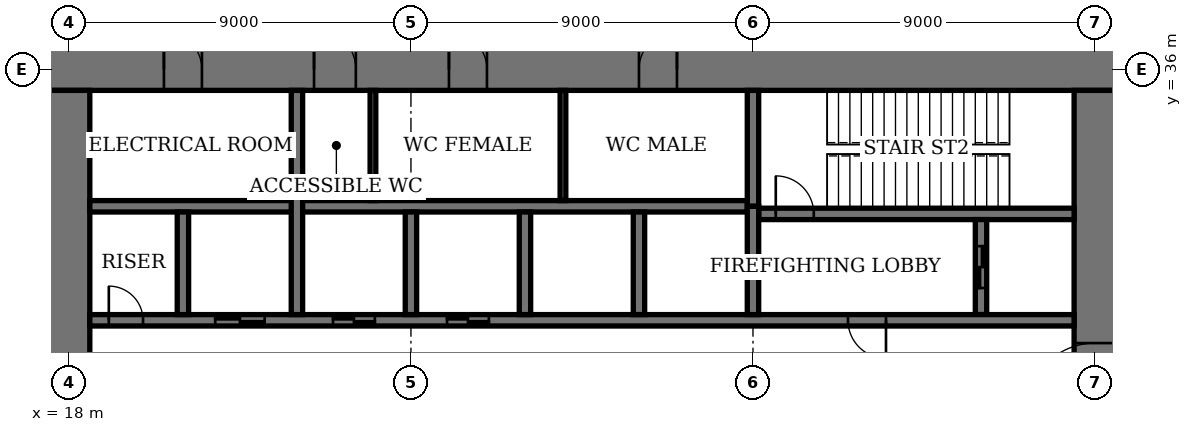
"""IFC4 building model, lengths in metres.
Left out: names, types, materials, properties, quantities, classifications, styles, units other than length and angle.
Written with IfcOpenShell. Run it as: python <this file> out.ifc"""

import sys

from ifc_helpers import new_model, si_unit, direction, frame, frame_2d, origin, place, context, subcontext, project, spatial, rectangle, extrude, element, fill, save


model = new_model("IFC4")
c1 = context("Model", 3, precision=1e-05, world=origin(), true_north=direction((0.0, 1.0)))
c2 = subcontext(c1, "Body", "Model", "MODEL_VIEW")
j1 = project(units=[si_unit("LENGTHUNIT", "METRE"), si_unit("PLANEANGLEUNIT", "RADIAN")], contexts=[c1])
p1 = place(None, origin())
s1 = spatial("IfcSite", under=j1, at=p1, CompositionType="ELEMENT")
p2 = place(p1, origin())
s2 = spatial("IfcBuilding", under=s1, at=p2, CompositionType="ELEMENT")
p3 = place(p2, frame((0.0, 0.0, 157.2)))
s3 = spatial("IfcBuildingStorey", under=s2, at=p3, CompositionType="ELEMENT", Elevation=157.2)
p4 = place(p3, frame((45.55, 36.0, 0.0), z_axis=(0.0, 0.0, 1.0), x_axis=(-1.0, 0.0, 0.0)))
e1 = element("IfcWall", 1, at=p4, inside=s3, PredefinedType="SHEAR", context=c2, shape_type="SweptSolid", body=[
    extrude(rectangle(XDim=28.1, YDim=1.1, at=frame_2d((14.05, 0.0))), origin(), (0.0, 0.0, 1.0), 5.0),
])
p5 = place(p4, frame((11.55, 0.0, 0.0)))
e2 = element("IfcOpeningElement", 2, at=p5, cuts=e1, PredefinedType="OPENING", context=c2, shape_type="SweptSolid", body=[
    extrude(rectangle(XDim=1.0, YDim=2.4, at=frame_2d((0.5, 1.2))), frame((0.0, 0.56, 0.0), z_axis=(0.0, -1.0, 0.0), x_axis=(1.0, 0.0, 0.0)), (0.0, 0.0, 1.0), 1.12),
])
p6 = place(p4, frame((16.55, 0.0, 0.0)))
e3 = element("IfcOpeningElement", 3, at=p6, cuts=e1, PredefinedType="OPENING", context=c2, shape_type="SweptSolid", body=[
    extrude(rectangle(XDim=1.0, YDim=2.4, at=frame_2d((0.5, 1.2))), frame((0.0, 0.56, 0.0), z_axis=(0.0, -1.0, 0.0), x_axis=(1.0, 0.0, 0.0)), (0.0, 0.0, 1.0), 1.12),
])
p7 = place(p4, frame((20.0, 0.0, 0.0)))
e4 = element("IfcOpeningElement", 4, at=p7, cuts=e1, PredefinedType="OPENING", context=c2, shape_type="SweptSolid", body=[
    extrude(rectangle(XDim=1.1, YDim=2.4, at=frame_2d((0.55, 1.2))), frame((0.0, 0.56, 0.0), z_axis=(0.0, -1.0, 0.0), x_axis=(1.0, 0.0, 0.0)), (0.0, 0.0, 1.0), 1.12),
])
p8 = place(p4, frame((24.05, 0.0, 0.0)))
e5 = element("IfcOpeningElement", 5, at=p8, cuts=e1, PredefinedType="OPENING", context=c2, shape_type="SweptSolid", body=[
    extrude(rectangle(XDim=1.0, YDim=2.4, at=frame_2d((0.5, 1.2))), frame((0.0, 0.56, 0.0), z_axis=(0.0, -1.0, 0.0), x_axis=(1.0, 0.0, 0.0)), (0.0, 0.0, 1.0), 1.12),
])
p9 = place(p3, frame((18.0, 35.45, 0.0), z_axis=(0.0, 0.0, 1.0), x_axis=(0.0, -1.0, 0.0)))
e6 = element("IfcWall", 6, at=p9, inside=s3, PredefinedType="SHEAR", context=c2, shape_type="SweptSolid", body=[
    extrude(rectangle(XDim=16.9, YDim=1.1, at=frame_2d((8.45, 0.0))), origin(), (0.0, 0.0, 1.0), 5.0),
])
p10 = place(p9, frame((8.45, 0.0, 0.0)))
e7 = element("IfcOpeningElement", 7, at=p10, cuts=e6, PredefinedType="OPENING", context=c2, shape_type="SweptSolid", body=[
    extrude(rectangle(XDim=1.8, YDim=2.4, at=frame_2d((0.9, 1.2))), frame((0.0, 0.56, 0.0), z_axis=(0.0, -1.0, 0.0), x_axis=(1.0, 0.0, 0.0)), (0.0, 0.0, 1.0), 1.12),
])
p11 = place(p3, frame((45.0, 18.55, 0.0), z_axis=(0.0, 0.0, 1.0), x_axis=(0.0, 1.0, 0.0)))
e8 = element("IfcWall", 8, at=p11, inside=s3, PredefinedType="SHEAR", context=c2, shape_type="SweptSolid", body=[
    extrude(rectangle(XDim=16.9, YDim=1.1, at=frame_2d((8.45, 0.0))), origin(), (0.0, 0.0, 1.0), 5.0),
])
p12 = place(p11, frame((8.45, 0.0, 0.0)))
e9 = element("IfcOpeningElement", 9, at=p12, cuts=e8, PredefinedType="OPENING", context=c2, shape_type="SweptSolid", body=[
    extrude(rectangle(XDim=1.8, YDim=2.4, at=frame_2d((0.9, 1.2))), frame((0.0, 0.56, 0.0), z_axis=(0.0, -1.0, 0.0), x_axis=(1.0, 0.0, 0.0)), (0.0, 0.0, 1.0), 1.12),
])
p13 = place(p3, frame((36.15, 32.2, 0.0), z_axis=(0.0, 0.0, 1.0), x_axis=(1.0, 0.0, 0.0)))
e10 = element("IfcWall", 10, at=p13, inside=s3, PredefinedType="SHEAR", context=c2, shape_type="SweptSolid", body=[
    extrude(rectangle(XDim=8.3, YDim=0.3, at=frame_2d((4.15, 0.0))), origin(), (0.0, 0.0, 1.0), 5.0),
])
p14 = place(p13, frame((0.45, 0.0, 0.0)))
e11 = element("IfcOpeningElement", 11, at=p14, cuts=e10, PredefinedType="OPENING", context=c2, shape_type="SweptSolid", body=[
    extrude(rectangle(XDim=1.0, YDim=2.4, at=frame_2d((0.5, 1.2))), frame((0.0, 0.16, 0.0), z_axis=(0.0, -1.0, 0.0), x_axis=(1.0, 0.0, 0.0)), (0.0, 0.0, 1.0), 0.32),
])
p15 = place(p3, frame((36.0, 32.4, 0.0), z_axis=(0.0, 0.0, 1.0), x_axis=(0.0, 1.0, 0.0)))
e12 = element("IfcWall", 12, at=p15, inside=s3, PredefinedType="SHEAR", context=c2, shape_type="SweptSolid", body=[
    extrude(rectangle(XDim=3.05, YDim=0.3, at=frame_2d((1.525, 0.0))), origin(), (0.0, 0.0, 1.0), 5.0),
])
p16 = place(p3, frame((42.0, 29.55, 0.0), z_axis=(0.0, 0.0, 1.0), x_axis=(0.0, 1.0, 0.0)))
e13 = element("IfcWall", 13, at=p16, inside=s3, PredefinedType="SHEAR", context=c2, shape_type="SweptSolid", body=[
    extrude(rectangle(XDim=2.5, YDim=0.3, at=frame_2d((1.25, 0.0))), origin(), (0.0, 0.0, 1.0), 5.0),
])
p17 = place(p16, frame((0.7, 0.0, 0.0)))
e14 = element("IfcOpeningElement", 14, at=p17, cuts=e13, PredefinedType="OPENING", context=c2, shape_type="SweptSolid", body=[
    extrude(rectangle(XDim=1.1, YDim=2.4, at=frame_2d((0.55, 1.2))), frame((0.0, 0.16, 0.0), z_axis=(0.0, -1.0, 0.0), x_axis=(1.0, 0.0, 0.0)), (0.0, 0.0, 1.0), 0.32),
])
p18 = place(p3, frame((18.55, 29.4, 0.0), z_axis=(0.0, 0.0, 1.0), x_axis=(1.0, 0.0, 0.0)))
e15 = element("IfcWall", 15, at=p18, inside=s3, PredefinedType="SHEAR", context=c2, shape_type="SweptSolid", body=[
    extrude(rectangle(XDim=25.9, YDim=0.3, at=frame_2d((12.95, 0.0))), origin(), (0.0, 0.0, 1.0), 5.0),
])
p19 = place(p18, frame((19.95, 0.0, 0.0)))
e16 = element("IfcOpeningElement", 16, at=p19, cuts=e15, PredefinedType="OPENING", context=c2, shape_type="SweptSolid", body=[
    extrude(rectangle(XDim=1.0, YDim=2.4, at=frame_2d((0.5, 1.2))), frame((0.0, 0.16, 0.0), z_axis=(0.0, -1.0, 0.0), x_axis=(1.0, 0.0, 0.0)), (0.0, 0.0, 1.0), 0.32),
])
p20 = place(p18, frame((0.5, 0.0, 0.0)))
e17 = element("IfcOpeningElement", 17, at=p20, cuts=e15, PredefinedType="OPENING", context=c2, shape_type="SweptSolid", body=[
    extrude(rectangle(XDim=0.9, YDim=2.1, at=frame_2d((0.45, 1.05))), frame((0.0, 0.16, 0.0), z_axis=(0.0, -1.0, 0.0), x_axis=(1.0, 0.0, 0.0)), (0.0, 0.0, 1.0), 0.32),
])
p21 = place(p18, frame((9.4, 0.0, 0.0)))
e18 = element("IfcOpeningElement", 18, at=p21, cuts=e15, PredefinedType="OPENING", context=c2, shape_type="SweptSolid", body=[
    extrude(rectangle(XDim=1.1, YDim=2.4, at=frame_2d((0.55, 1.2))), frame((0.0, 0.16, 0.0), z_axis=(0.0, -1.0, 0.0), x_axis=(1.0, 0.0, 0.0)), (0.0, 0.0, 1.0), 0.32),
])
p22 = place(p18, frame((6.4, 0.0, 0.0)))
e19 = element("IfcOpeningElement", 19, at=p22, cuts=e15, PredefinedType="OPENING", context=c2, shape_type="SweptSolid", body=[
    extrude(rectangle(XDim=1.1, YDim=2.4, at=frame_2d((0.55, 1.2))), frame((0.0, 0.16, 0.0), z_axis=(0.0, -1.0, 0.0), x_axis=(1.0, 0.0, 0.0)), (0.0, 0.0, 1.0), 0.32),
])
p23 = place(p18, frame((3.3, 0.0, 0.0)))
e20 = element("IfcOpeningElement", 20, at=p23, cuts=e15, PredefinedType="OPENING", context=c2, shape_type="SweptSolid", body=[
    extrude(rectangle(XDim=1.3, YDim=2.4, at=frame_2d((0.65, 1.2))), frame((0.0, 0.16, 0.0), z_axis=(0.0, -1.0, 0.0), x_axis=(1.0, 0.0, 0.0)), (0.0, 0.0, 1.0), 0.32),
])
p24 = place(p3, frame((18.55, 32.4, 0.0), z_axis=(0.0, 0.0, 1.0), x_axis=(1.0, 0.0, 0.0)))
e21 = element("IfcWall", 21, at=p24, inside=s3, PredefinedType="SHEAR", context=c2, shape_type="SweptSolid", body=[
    extrude(rectangle(XDim=17.3, YDim=0.3, at=frame_2d((8.65, 0.0))), origin(), (0.0, 0.0, 1.0), 5.0),
])
for number, where, z_axis, x_axis in (
    (22, (33.0, 29.55, 0.0), (0.0, 0.0, 1.0), (0.0, 1.0, 0.0)),
    (23, (30.0, 29.55, 0.0), (0.0, 0.0, 1.0), (0.0, 1.0, 0.0)),
    (24, (27.0, 29.55, 0.0), (0.0, 0.0, 1.0), (0.0, 1.0, 0.0)),
):
    element("IfcWall", number, at=place(p3, frame(where, z_axis=z_axis, x_axis=x_axis)), inside=s3, PredefinedType="SHEAR", context=c2, shape_type="SweptSolid", body=[
        extrude(rectangle(XDim=2.7, YDim=0.3, at=frame_2d((1.35, 0.0))), origin(), (0.0, 0.0, 1.0), 5.0),
    ])
p25 = place(p3, frame((24.0, 29.55, 0.0), z_axis=(0.0, 0.0, 1.0), x_axis=(0.0, 1.0, 0.0)))
e25 = element("IfcWall", 25, at=p25, inside=s3, PredefinedType="SHEAR", context=c2, shape_type="SweptSolid", body=[
    extrude(rectangle(XDim=5.9, YDim=0.3, at=frame_2d((2.95, 0.0))), origin(), (0.0, 0.0, 1.0), 5.0),
])
p26 = place(p3, frame((21.0, 29.55, 0.0), z_axis=(0.0, 0.0, 1.0), x_axis=(0.0, 1.0, 0.0)))
e26 = element("IfcWall", 26, at=p26, inside=s3, PredefinedType="SHEAR", context=c2, shape_type="SweptSolid", body=[
    extrude(rectangle(XDim=2.7, YDim=0.3, at=frame_2d((1.35, 0.0))), origin(), (0.0, 0.0, 1.0), 5.0),
])
p27 = place(p3, frame((36.0, 29.55, 0.0), z_axis=(0.0, 0.0, 1.0), x_axis=(0.0, 1.0, 0.0)))
e27 = element("IfcWall", 27, at=p27, inside=s3, PredefinedType="SHEAR", context=c2, shape_type="SweptSolid", body=[
    extrude(rectangle(XDim=2.85, YDim=0.3, at=frame_2d((1.425, 0.0))), origin(), (0.0, 0.0, 1.0), 5.0),
])
for number, where, z_axis, x_axis in (
    (28, (31.0, 32.55, 0.0), (0.0, 0.0, 1.0), (0.0, 1.0, 0.0)),
    (29, (26.0, 32.55, 0.0), (0.0, 0.0, 1.0), (0.0, 1.0, 0.0)),
):
    element("IfcWall", number, at=place(p3, frame(where, z_axis=z_axis, x_axis=x_axis)), inside=s3, PredefinedType="PARTITIONING", context=c2, shape_type="SweptSolid", body=[
        extrude(rectangle(XDim=2.9, YDim=0.15, at=frame_2d((1.45, 0.0))), origin(), (0.0, 0.0, 1.0), 4.6),
    ])
p28 = place(p12, origin())
e30 = element("IfcDoor", 30, at=p28, inside=s3, OperationType="DOUBLE_DOOR_DOUBLE_SWING", PredefinedType="DOOR", context=c2, shape_type="SweptSolid", body=[
    extrude(rectangle(XDim=1.8, YDim=2.4, at=frame_2d((0.9, 1.2))), frame((0.0, 0.03, 0.0), z_axis=(0.0, -1.0, 0.0), x_axis=(1.0, 0.0, 0.0)), (0.0, 0.0, 1.0), 0.06),
    extrude(rectangle(XDim=0.04, YDim=2.4, at=frame_2d((0.02, 1.2))), frame((0.0, 0.55, 0.0), z_axis=(0.0, -1.0, 0.0), x_axis=(1.0, 0.0, 0.0)), (0.0, 0.0, 1.0), 1.1),
    extrude(rectangle(XDim=0.04, YDim=2.4, at=frame_2d((1.78, 1.2))), frame((0.0, 0.55, 0.0), z_axis=(0.0, -1.0, 0.0), x_axis=(1.0, 0.0, 0.0)), (0.0, 0.0, 1.0), 1.1),
    extrude(rectangle(XDim=1.8, YDim=0.04, at=frame_2d((0.9, 2.38))), frame((0.0, 0.55, 0.0), z_axis=(0.0, -1.0, 0.0), x_axis=(1.0, 0.0, 0.0)), (0.0, 0.0, 1.0), 1.1),
])
fill(e9, e30)
p29 = place(p5, origin())
e31 = element("IfcDoor", 31, at=p29, inside=s3, OperationType="SINGLE_SWING_LEFT", PredefinedType="DOOR", context=c2, shape_type="SweptSolid", body=[
    extrude(rectangle(XDim=1.0, YDim=2.4, at=frame_2d((0.5, 1.2))), frame((0.0, 0.025, 0.0), z_axis=(0.0, -1.0, 0.0), x_axis=(1.0, 0.0, 0.0)), (0.0, 0.0, 1.0), 0.05),
    extrude(rectangle(XDim=0.04, YDim=2.4, at=frame_2d((0.02, 1.2))), frame((0.0, 0.4, 0.0), z_axis=(0.0, -1.0, 0.0), x_axis=(1.0, 0.0, 0.0)), (0.0, 0.0, 1.0), 0.8),
    extrude(rectangle(XDim=0.04, YDim=2.4, at=frame_2d((0.98, 1.2))), frame((0.0, 0.4, 0.0), z_axis=(0.0, -1.0, 0.0), x_axis=(1.0, 0.0, 0.0)), (0.0, 0.0, 1.0), 0.8),
    extrude(rectangle(XDim=1.0, YDim=0.04, at=frame_2d((0.5, 2.38))), frame((0.0, 0.4, 0.0), z_axis=(0.0, -1.0, 0.0), x_axis=(1.0, 0.0, 0.0)), (0.0, 0.0, 1.0), 0.8),
])
fill(e2, e31)
p30 = place(p6, origin())
e32 = element("IfcDoor", 32, at=p30, inside=s3, OperationType="SINGLE_SWING_RIGHT", PredefinedType="DOOR", context=c2, shape_type="SweptSolid", body=[
    extrude(rectangle(XDim=1.0, YDim=2.4, at=frame_2d((0.5, 1.2))), frame((0.0, 0.025, 0.0), z_axis=(0.0, -1.0, 0.0), x_axis=(1.0, 0.0, 0.0)), (0.0, 0.0, 1.0), 0.05),
    extrude(rectangle(XDim=0.04, YDim=2.4, at=frame_2d((0.02, 1.2))), frame((0.0, 0.4, 0.0), z_axis=(0.0, -1.0, 0.0), x_axis=(1.0, 0.0, 0.0)), (0.0, 0.0, 1.0), 0.8),
    extrude(rectangle(XDim=0.04, YDim=2.4, at=frame_2d((0.98, 1.2))), frame((0.0, 0.4, 0.0), z_axis=(0.0, -1.0, 0.0), x_axis=(1.0, 0.0, 0.0)), (0.0, 0.0, 1.0), 0.8),
    extrude(rectangle(XDim=1.0, YDim=0.04, at=frame_2d((0.5, 2.38))), frame((0.0, 0.4, 0.0), z_axis=(0.0, -1.0, 0.0), x_axis=(1.0, 0.0, 0.0)), (0.0, 0.0, 1.0), 0.8),
])
fill(e3, e32)
p31 = place(p7, origin())
e33 = element("IfcDoor", 33, at=p31, inside=s3, OperationType="SINGLE_SWING_RIGHT", PredefinedType="DOOR", context=c2, shape_type="SweptSolid", body=[
    extrude(rectangle(XDim=1.1, YDim=2.4, at=frame_2d((0.55, 1.2))), frame((0.0, 0.025, 0.0), z_axis=(0.0, -1.0, 0.0), x_axis=(1.0, 0.0, 0.0)), (0.0, 0.0, 1.0), 0.05),
    extrude(rectangle(XDim=0.04, YDim=2.4, at=frame_2d((0.02, 1.2))), frame((0.0, 0.44, 0.0), z_axis=(0.0, -1.0, 0.0), x_axis=(1.0, 0.0, 0.0)), (0.0, 0.0, 1.0), 0.88),
    extrude(rectangle(XDim=0.04, YDim=2.4, at=frame_2d((1.08, 1.2))), frame((0.0, 0.44, 0.0), z_axis=(0.0, -1.0, 0.0), x_axis=(1.0, 0.0, 0.0)), (0.0, 0.0, 1.0), 0.88),
    extrude(rectangle(XDim=1.1, YDim=0.04, at=frame_2d((0.55, 2.38))), frame((0.0, 0.44, 0.0), z_axis=(0.0, -1.0, 0.0), x_axis=(1.0, 0.0, 0.0)), (0.0, 0.0, 1.0), 0.88),
])
fill(e4, e33)
p32 = place(p8, origin())
e34 = element("IfcDoor", 34, at=p32, inside=s3, OperationType="SINGLE_SWING_RIGHT", PredefinedType="DOOR", context=c2, shape_type="SweptSolid", body=[
    extrude(rectangle(XDim=1.0, YDim=2.4, at=frame_2d((0.5, 1.2))), frame((0.0, 0.025, 0.0), z_axis=(0.0, -1.0, 0.0), x_axis=(1.0, 0.0, 0.0)), (0.0, 0.0, 1.0), 0.05),
    extrude(rectangle(XDim=0.04, YDim=2.4, at=frame_2d((0.02, 1.2))), frame((0.0, 0.4, 0.0), z_axis=(0.0, -1.0, 0.0), x_axis=(1.0, 0.0, 0.0)), (0.0, 0.0, 1.0), 0.8),
    extrude(rectangle(XDim=0.04, YDim=2.4, at=frame_2d((0.98, 1.2))), frame((0.0, 0.4, 0.0), z_axis=(0.0, -1.0, 0.0), x_axis=(1.0, 0.0, 0.0)), (0.0, 0.0, 1.0), 0.8),
    extrude(rectangle(XDim=1.0, YDim=0.04, at=frame_2d((0.5, 2.38))), frame((0.0, 0.4, 0.0), z_axis=(0.0, -1.0, 0.0), x_axis=(1.0, 0.0, 0.0)), (0.0, 0.0, 1.0), 0.8),
])
fill(e5, e34)
p33 = place(p14, origin())
e35 = element("IfcDoor", 35, at=p33, inside=s3, OperationType="SINGLE_SWING_RIGHT", PredefinedType="DOOR", context=c2, shape_type="SweptSolid", body=[
    extrude(rectangle(XDim=1.0, YDim=2.4, at=frame_2d((0.5, 1.2))), frame((0.0, 0.03, 0.0), z_axis=(0.0, -1.0, 0.0), x_axis=(1.0, 0.0, 0.0)), (0.0, 0.0, 1.0), 0.06),
])
fill(e11, e35)
p34 = place(p19, origin())
e36 = element("IfcDoor", 36, at=p34, inside=s3, OperationType="SINGLE_SWING_RIGHT", PredefinedType="DOOR", context=c2, shape_type="SweptSolid", body=[
    extrude(rectangle(XDim=1.0, YDim=2.4, at=frame_2d((0.5, 1.2))), frame((0.0, 0.03, 0.0), z_axis=(0.0, -1.0, 0.0), x_axis=(1.0, 0.0, 0.0)), (0.0, 0.0, 1.0), 0.06),
])
fill(e16, e36)
p35 = place(p20, origin())
e37 = element("IfcDoor", 37, at=p35, inside=s3, OperationType="SINGLE_SWING_RIGHT", PredefinedType="DOOR", context=c2, shape_type="SweptSolid", body=[
    extrude(rectangle(XDim=0.9, YDim=2.1, at=frame_2d((0.45, 1.05))), frame((0.0, 0.03, 0.0), z_axis=(0.0, -1.0, 0.0), x_axis=(1.0, 0.0, 0.0)), (0.0, 0.0, 1.0), 0.06),
])
fill(e17, e37)
p36 = place(p21, origin())
e38 = element("IfcDoor", 38, at=p36, inside=s3, OperationType="DOUBLE_DOOR_SLIDING", PredefinedType="DOOR", context=c2, shape_type="SweptSolid", body=[
    extrude(rectangle(XDim=1.1, YDim=2.4, at=frame_2d((0.55, 1.2))), frame((0.0, 0.02, 0.0), z_axis=(0.0, -1.0, 0.0), x_axis=(1.0, 0.0, 0.0)), (0.0, 0.0, 1.0), 0.04),
])
fill(e18, e38)
p37 = place(p22, origin())
e39 = element("IfcDoor", 39, at=p37, inside=s3, OperationType="DOUBLE_DOOR_SLIDING", PredefinedType="DOOR", context=c2, shape_type="SweptSolid", body=[
    extrude(rectangle(XDim=1.1, YDim=2.4, at=frame_2d((0.55, 1.2))), frame((0.0, 0.02, 0.0), z_axis=(0.0, -1.0, 0.0), x_axis=(1.0, 0.0, 0.0)), (0.0, 0.0, 1.0), 0.04),
])
fill(e19, e39)
p38 = place(p23, origin())
e40 = element("IfcDoor", 40, at=p38, inside=s3, OperationType="DOUBLE_DOOR_SLIDING", PredefinedType="DOOR", context=c2, shape_type="SweptSolid", body=[
    extrude(rectangle(XDim=1.3, YDim=2.4, at=frame_2d((0.65, 1.2))), frame((0.0, 0.02, 0.0), z_axis=(0.0, -1.0, 0.0), x_axis=(1.0, 0.0, 0.0)), (0.0, 0.0, 1.0), 0.04),
])
fill(e20, e40)
p39 = place(p17, origin())
e41 = element("IfcDoor", 41, at=p39, inside=s3, OperationType="DOUBLE_DOOR_SLIDING", PredefinedType="DOOR", context=c2, shape_type="SweptSolid", body=[
    extrude(rectangle(XDim=1.1, YDim=2.4, at=frame_2d((0.55, 1.2))), frame((0.0, 0.03, 0.0), z_axis=(0.0, -1.0, 0.0), x_axis=(1.0, 0.0, 0.0)), (0.0, 0.0, 1.0), 0.06),
])
fill(e14, e41)
save(model, sys.argv[1])
